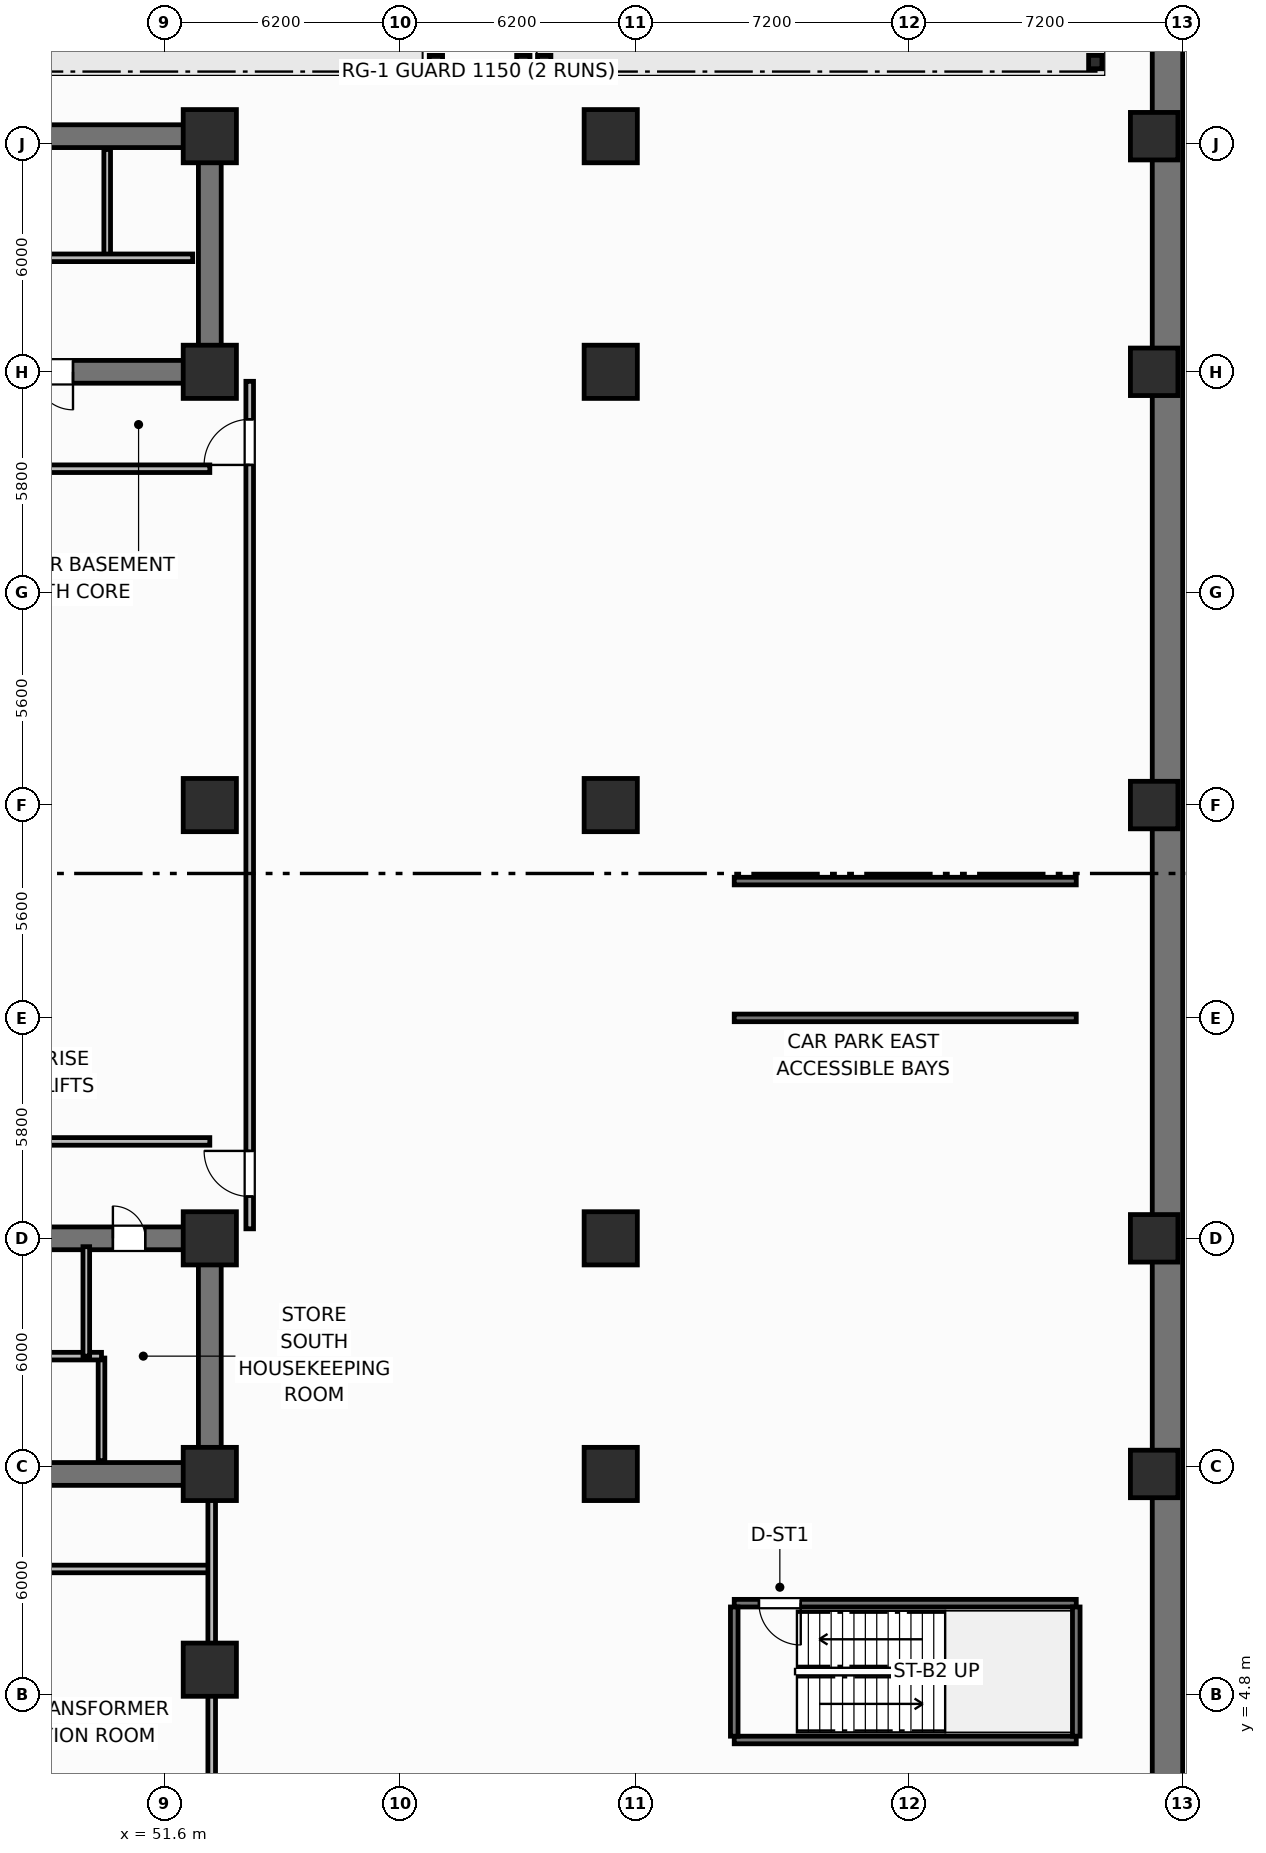
"""IFC4 building model, lengths in metres.
Left out: names, types, materials, properties, quantities, classifications, styles, units other than length and angle.
Written with IfcOpenShell. Run it as: python <this file> out.ifc"""

import sys

from ifc_helpers import new_model, si_unit, direction, frame, frame_2d, origin, origin_2d, place, context, subcontext, project, spatial, rectangle, i_section, extrude, element, fill, save


model = new_model("IFC4")
c1 = context("Model", 3, precision=1e-05, world=origin(), true_north=direction((0.0, 1.0)))
c2 = subcontext(c1, "Body", "Model", "MODEL_VIEW")
j1 = project(units=[si_unit("LENGTHUNIT", "METRE"), si_unit("PLANEANGLEUNIT", "RADIAN")], contexts=[c1])
p1 = place(None, origin())
s1 = spatial("IfcSite", under=j1, at=p1, CompositionType="ELEMENT")
p2 = place(p1, origin())
s2 = spatial("IfcBuilding", under=s1, at=p2, CompositionType="ELEMENT")
p3 = place(p2, frame((0.0, 0.0, -4.8)))
s3 = spatial("IfcBuildingStorey", under=s2, at=p3, CompositionType="ELEMENT", Elevation=-4.8)
p4 = place(p3, frame((78.0, 55.6, 0.0), z_axis=(0.0, 0.0, 1.0), x_axis=(0.0, -1.0, 0.0)))
e1 = element("IfcWall", 1, at=p4, inside=s3, PredefinedType="USERDEFINED", context=c2, shape_type="SweptSolid", body=[
    extrude(rectangle(XDim=54.8, YDim=0.8, at=frame_2d((27.4, 0.0))), origin(), (0.0, 0.0, 1.0), 4.8),
])
for number, where, z_axis, x_axis in (
    (2, (58.75, 47.75, 0.0), (0.0, 0.0, 1.0), (1.0, 0.0, 0.0)),
    (3, (61.05, 47.75, 0.0), (0.0, 0.0, 1.0), (1.0, 0.0, 0.0)),
):
    element("IfcColumn", number, at=place(p3, frame(where, z_axis=z_axis, x_axis=x_axis)), inside=s3, PredefinedType="COLUMN", context=c2, shape_type="SweptSolid", body=[
        extrude(i_section(OverallWidth=0.35, OverallDepth=0.352, WebThickness=0.013, FlangeThickness=0.021, at=origin_2d()), origin(), (0.0, 0.0, 1.0), 2.09),
    ])
p5 = place(p3, frame((61.6, 47.75, 0.0), z_axis=(0.0, 0.0, 1.0), x_axis=(1.0, 0.0, 0.0)))
e4 = element("IfcColumn", 4, at=p5, inside=s3, PredefinedType="COLUMN", context=c2, shape_type="SweptSolid", body=[
    extrude(i_section(OverallWidth=0.35, OverallDepth=0.352, WebThickness=0.013, FlangeThickness=0.021, at=origin_2d()), origin(), (0.0, 0.0, 1.0), 2.13),
])
p6 = place(p3, frame((76.1, 47.75, 0.0), z_axis=(0.0, 0.0, 1.0), x_axis=(1.0, 0.0, 0.0)))
e5 = element("IfcColumn", 5, at=p6, inside=s3, PredefinedType="COLUMN", context=c2, shape_type="SweptSolid", body=[
    extrude(i_section(OverallWidth=0.35, OverallDepth=0.352, WebThickness=0.013, FlangeThickness=0.021, at=origin_2d()), origin(), (0.0, 0.0, 1.0), 4.46),
])
p7 = place(p3, frame((52.8, 10.6, 0.0), z_axis=(0.0, 0.0, 1.0), x_axis=(-1.0, 0.0, 0.0)))
e6 = element("IfcWall", 6, at=p7, inside=s3, PredefinedType="SHEAR", context=c2, shape_type="SweptSolid", body=[
    extrude(rectangle(XDim=27.2, YDim=0.6, at=frame_2d((13.6, 0.0))), origin(), (0.0, 0.0, 1.0), 4.8),
])
p8 = place(p3, frame((52.8, 10.9, 0.0), z_axis=(0.0, 0.0, 1.0), x_axis=(0.0, 1.0, 0.0)))
e7 = element("IfcWall", 7, at=p8, inside=s3, PredefinedType="SHEAR", context=c2, shape_type="SweptSolid", body=[
    extrude(rectangle(XDim=5.6, YDim=0.6, at=frame_2d((2.8, 0.0))), origin(), (0.0, 0.0, 1.0), 4.8),
])
p9 = place(p3, frame((25.6, 16.8, 0.0), z_axis=(0.0, 0.0, 1.0), x_axis=(1.0, 0.0, 0.0)))
e8 = element("IfcWall", 8, at=p9, inside=s3, PredefinedType="SHEAR", context=c2, shape_type="SweptSolid", body=[
    extrude(rectangle(XDim=27.2, YDim=0.6, at=frame_2d((13.6, 0.0))), origin(), (0.0, 0.0, 1.0), 4.8),
])
p10 = place(p9, frame((1.9, 0.0, 0.0)))
e9 = element("IfcOpeningElement", 9, at=p10, cuts=e8, PredefinedType="OPENING", context=c2, shape_type="SweptSolid", body=[
    extrude(rectangle(XDim=1.1, YDim=2.15, at=frame_2d((0.55, 1.075))), frame((0.0, 0.31, 0.0), z_axis=(0.0, -1.0, 0.0), x_axis=(1.0, 0.0, 0.0)), (0.0, 0.0, 1.0), 0.62),
])
p11 = place(p9, frame((13.0, 0.0, 0.0)))
e10 = element("IfcOpeningElement", 10, at=p11, cuts=e8, PredefinedType="OPENING", context=c2, shape_type="SweptSolid", body=[
    extrude(rectangle(XDim=1.2, YDim=2.15, at=frame_2d((0.6, 1.075))), frame((0.0, 0.31, 0.0), z_axis=(0.0, -1.0, 0.0), x_axis=(1.0, 0.0, 0.0)), (0.0, 0.0, 1.0), 0.62),
])
p12 = place(p9, frame((20.4, 0.0, 0.0)))
e11 = element("IfcOpeningElement", 11, at=p12, cuts=e8, PredefinedType="OPENING", context=c2, shape_type="SweptSolid", body=[
    extrude(rectangle(XDim=1.3, YDim=2.2, at=frame_2d((0.65, 1.1))), frame((0.0, 0.31, 0.0), z_axis=(0.0, -1.0, 0.0), x_axis=(1.0, 0.0, 0.0)), (0.0, 0.0, 1.0), 0.62),
])
p13 = place(p9, frame((24.65, 0.0, 0.0)))
e12 = element("IfcOpeningElement", 12, at=p13, cuts=e8, PredefinedType="OPENING", context=c2, shape_type="SweptSolid", body=[
    extrude(rectangle(XDim=0.85, YDim=2.1, at=frame_2d((0.425, 1.05))), frame((0.0, 0.31, 0.0), z_axis=(0.0, -1.0, 0.0), x_axis=(1.0, 0.0, 0.0)), (0.0, 0.0, 1.0), 0.62),
])
p14 = place(p3, frame((25.6, 45.8, 0.0), z_axis=(0.0, 0.0, 1.0), x_axis=(1.0, 0.0, 0.0)))
e13 = element("IfcWall", 13, at=p14, inside=s3, PredefinedType="SHEAR", context=c2, shape_type="SweptSolid", body=[
    extrude(rectangle(XDim=27.2, YDim=0.6, at=frame_2d((13.6, 0.0))), origin(), (0.0, 0.0, 1.0), 4.8),
])
p15 = place(p3, frame((52.8, 39.9, 0.0), z_axis=(0.0, 0.0, 1.0), x_axis=(0.0, 1.0, 0.0)))
e14 = element("IfcWall", 14, at=p15, inside=s3, PredefinedType="SHEAR", context=c2, shape_type="SweptSolid", body=[
    extrude(rectangle(XDim=5.6, YDim=0.6, at=frame_2d((2.8, 0.0))), origin(), (0.0, 0.0, 1.0), 4.8),
])
p16 = place(p3, frame((52.8, 39.6, 0.0), z_axis=(0.0, 0.0, 1.0), x_axis=(-1.0, 0.0, 0.0)))
e15 = element("IfcWall", 15, at=p16, inside=s3, PredefinedType="SHEAR", context=c2, shape_type="SweptSolid", body=[
    extrude(rectangle(XDim=27.2, YDim=0.6, at=frame_2d((13.6, 0.0))), origin(), (0.0, 0.0, 1.0), 4.8),
])
p17 = place(p16, frame((24.2, 0.0, 0.0)))
e16 = element("IfcOpeningElement", 16, at=p17, cuts=e15, PredefinedType="OPENING", context=c2, shape_type="SweptSolid", body=[
    extrude(rectangle(XDim=1.1, YDim=2.15, at=frame_2d((0.55, 1.075))), frame((0.0, 0.31, 0.0), z_axis=(0.0, -1.0, 0.0), x_axis=(1.0, 0.0, 0.0)), (0.0, 0.0, 1.0), 0.62),
])
p18 = place(p16, frame((15.1, 0.0, 0.0)))
e17 = element("IfcOpeningElement", 17, at=p18, cuts=e15, PredefinedType="OPENING", context=c2, shape_type="SweptSolid", body=[
    extrude(rectangle(XDim=1.2, YDim=2.15, at=frame_2d((0.6, 1.075))), frame((0.0, 0.31, 0.0), z_axis=(0.0, -1.0, 0.0), x_axis=(1.0, 0.0, 0.0)), (0.0, 0.0, 1.0), 0.62),
])
p19 = place(p16, frame((11.6, 0.0, 0.0)))
e18 = element("IfcOpeningElement", 18, at=p19, cuts=e15, PredefinedType="OPENING", context=c2, shape_type="SweptSolid", body=[
    extrude(rectangle(XDim=0.9, YDim=2.1, at=frame_2d((0.45, 1.05))), frame((0.0, 0.31, 0.0), z_axis=(0.0, -1.0, 0.0), x_axis=(1.0, 0.0, 0.0)), (0.0, 0.0, 1.0), 0.62),
])
p20 = place(p16, frame((3.6, 0.0, 0.0)))
e19 = element("IfcOpeningElement", 19, at=p20, cuts=e15, PredefinedType="OPENING", context=c2, shape_type="SweptSolid", body=[
    extrude(rectangle(XDim=1.0, YDim=2.15, at=frame_2d((0.5, 1.075))), frame((0.0, 0.31, 0.0), z_axis=(0.0, -1.0, 0.0), x_axis=(1.0, 0.0, 0.0)), (0.0, 0.0, 1.0), 0.62),
])
for number, where, z_axis, x_axis in (
    (20, (52.8, 10.6, 0.0), (0.0, 0.0, 1.0), (1.0, 0.0, 0.0)),
    (21, (52.8, 16.8, 0.0), (0.0, 0.0, 1.0), (1.0, 0.0, 0.0)),
    (22, (52.8, 39.6, 0.0), (0.0, 0.0, 1.0), (1.0, 0.0, 0.0)),
    (23, (52.8, 45.8, 0.0), (0.0, 0.0, 1.0), (1.0, 0.0, 0.0)),
    (24, (52.8, 28.2, 0.0), (0.0, 0.0, 1.0), (1.0, 0.0, 0.0)),
):
    element("IfcColumn", number, at=place(p3, frame(where, z_axis=z_axis, x_axis=x_axis)), inside=s3, PredefinedType="COLUMN", context=c2, shape_type="SweptSolid", body=[
        extrude(rectangle(XDim=1.4, YDim=1.4, at=origin_2d()), origin(), (0.0, 0.0, 1.0), 4.8),
    ])
for number, where, z_axis, x_axis in (
    (25, (77.65, 10.6, 0.0), (0.0, 0.0, 1.0), (1.0, 0.0, 0.0)),
    (26, (77.65, 16.8, 0.0), (0.0, 0.0, 1.0), (1.0, 0.0, 0.0)),
    (27, (77.65, 28.2, 0.0), (0.0, 0.0, 1.0), (1.0, 0.0, 0.0)),
    (28, (77.65, 39.6, 0.0), (0.0, 0.0, 1.0), (1.0, 0.0, 0.0)),
    (29, (77.65, 45.8, 0.0), (0.0, 0.0, 1.0), (1.0, 0.0, 0.0)),
):
    element("IfcColumn", number, at=place(p3, frame(where, z_axis=z_axis, x_axis=x_axis)), inside=s3, PredefinedType="COLUMN", context=c2, shape_type="SweptSolid", body=[
        extrude(rectangle(XDim=1.25, YDim=1.25, at=origin_2d()), origin(), (0.0, 0.0, 1.0), 4.8),
    ])
for number, where, z_axis, x_axis in (
    (30, (52.8, 5.45, 0.0), (0.0, 0.0, 1.0), (1.0, 0.0, 0.0)),
    (31, (63.35, 10.6, 0.0), (0.0, 0.0, 1.0), (1.0, 0.0, 0.0)),
    (32, (63.35, 16.8, 0.0), (0.0, 0.0, 1.0), (1.0, 0.0, 0.0)),
    (33, (63.35, 28.2, 0.0), (0.0, 0.0, 1.0), (1.0, 0.0, 0.0)),
    (34, (63.35, 39.6, 0.0), (0.0, 0.0, 1.0), (1.0, 0.0, 0.0)),
    (35, (63.35, 45.8, 0.0), (0.0, 0.0, 1.0), (1.0, 0.0, 0.0)),
):
    element("IfcColumn", number, at=place(p3, frame(where, z_axis=z_axis, x_axis=x_axis)), inside=s3, PredefinedType="COLUMN", context=c2, shape_type="SweptSolid", body=[
        extrude(rectangle(XDim=1.4, YDim=1.4, at=origin_2d()), origin(), (0.0, 0.0, 1.0), 4.8),
    ])
for number, where, z_axis, x_axis in (
    (36, (66.6, 22.6, 0.0), (0.0, 0.0, 1.0), (1.0, 0.0, 0.0)),
    (37, (66.6, 26.2, 0.0), (0.0, 0.0, 1.0), (1.0, 0.0, 0.0)),
):
    element("IfcWall", number, at=place(p3, frame(where, z_axis=z_axis, x_axis=x_axis)), inside=s3, PredefinedType="SHEAR", context=c2, shape_type="SweptSolid", body=[
        extrude(rectangle(XDim=9.0, YDim=0.2, at=frame_2d((4.5, 0.0))), origin(), (0.0, 0.0, 1.0), 4.8),
    ])
p21 = place(p3, frame((49.95, 10.95, 0.0), z_axis=(0.0, 0.0, 1.0), x_axis=(0.0, 1.0, 0.0)))
e38 = element("IfcWall", 38, at=p21, inside=s3, PredefinedType="PARTITIONING", context=c2, shape_type="SweptSolid", body=[
    extrude(rectangle(XDim=2.7, YDim=0.175, at=frame_2d((1.35, 0.0))), origin(), (0.0, 0.0, 1.0), 3.67),
])
p22 = place(p3, frame((43.55, 13.7, 0.0), z_axis=(0.0, 0.0, 1.0), x_axis=(1.0, 0.0, 0.0)))
e39 = element("IfcWall", 39, at=p22, inside=s3, PredefinedType="PARTITIONING", context=c2, shape_type="SweptSolid", body=[
    extrude(rectangle(XDim=6.4, YDim=0.2, at=frame_2d((3.2, 0.0))), origin(), (0.0, 0.0, 1.0), 3.67),
])
p23 = place(p3, frame((49.55, 13.7, 0.0), z_axis=(0.0, 0.0, 1.0), x_axis=(0.0, 1.0, 0.0)))
e40 = element("IfcWall", 40, at=p23, inside=s3, PredefinedType="PARTITIONING", context=c2, shape_type="SweptSolid", body=[
    extrude(rectangle(XDim=2.88, YDim=0.175, at=frame_2d((1.44, 0.0))), origin(), (0.0, 0.0, 1.0), 3.67),
])
p24 = place(p3, frame((50.1, 42.65, 0.0), z_axis=(0.0, 0.0, 1.0), x_axis=(0.0, 1.0, 0.0)))
e41 = element("IfcWall", 41, at=p24, inside=s3, PredefinedType="PARTITIONING", context=c2, shape_type="SweptSolid", body=[
    extrude(rectangle(XDim=2.8, YDim=0.175, at=frame_2d((1.4, 0.0))), origin(), (0.0, 0.0, 1.0), 3.67),
])
p25 = place(p3, frame((52.35, 42.6, 0.0), z_axis=(0.0, 0.0, 1.0), x_axis=(-1.0, 0.0, 0.0)))
e42 = element("IfcWall", 42, at=p25, inside=s3, PredefinedType="PARTITIONING", context=c2, shape_type="SweptSolid", body=[
    extrude(rectangle(XDim=8.8, YDim=0.2, at=frame_2d((4.4, 0.0))), origin(), (0.0, 0.0, 1.0), 3.67),
])
p26 = place(p3, frame((66.6, 3.6, 0.0), z_axis=(0.0, 0.0, 1.0), x_axis=(1.0, 0.0, 0.0)))
e43 = element("IfcWall", 43, at=p26, inside=s3, PredefinedType="SHEAR", context=c2, shape_type="SweptSolid", body=[
    extrude(rectangle(XDim=9.0, YDim=0.2, at=frame_2d((4.5, 0.0))), origin(), (0.0, 0.0, 1.0), 4.8),
])
p27 = place(p3, frame((75.6, 7.2, 0.0), z_axis=(0.0, 0.0, 1.0), x_axis=(-1.0, 0.0, 0.0)))
e44 = element("IfcWall", 44, at=p27, inside=s3, PredefinedType="SHEAR", context=c2, shape_type="SweptSolid", body=[
    extrude(rectangle(XDim=9.0, YDim=0.2, at=frame_2d((4.5, 0.0))), origin(), (0.0, 0.0, 1.0), 4.8),
])
p28 = place(p27, frame((7.25, 0.0, 0.0)))
e45 = element("IfcOpeningElement", 45, at=p28, cuts=e44, PredefinedType="OPENING", context=c2, shape_type="SweptSolid", body=[
    extrude(rectangle(XDim=1.1, YDim=2.15, at=frame_2d((0.55, 1.075))), frame((0.0, 0.11, 0.0), z_axis=(0.0, -1.0, 0.0), x_axis=(1.0, 0.0, 0.0)), (0.0, 0.0, 1.0), 0.22),
])
for number, where, z_axis, x_axis in (
    (46, (66.6, 3.7, 0.0), (0.0, 0.0, 1.0), (0.0, 1.0, 0.0)),
    (47, (75.6, 3.7, 0.0), (0.0, 0.0, 1.0), (0.0, 1.0, 0.0)),
):
    element("IfcWall", number, at=place(p3, frame(where, z_axis=z_axis, x_axis=x_axis)), inside=s3, PredefinedType="SHEAR", context=c2, shape_type="SweptSolid", body=[
        extrude(rectangle(XDim=3.4, YDim=0.2, at=frame_2d((1.7, 0.0))), origin(), (0.0, 0.0, 1.0), 4.8),
    ])
p29 = place(p3, frame((25.6, 19.35, 0.0), z_axis=(0.0, 0.0, 1.0), x_axis=(1.0, 0.0, 0.0)))
e48 = element("IfcWall", 48, at=p29, inside=s3, PredefinedType="PARTITIONING", context=c2, shape_type="SweptSolid", body=[
    extrude(rectangle(XDim=27.2, YDim=0.2, at=frame_2d((13.6, 0.0))), origin(), (0.0, 0.0, 1.0), 3.67),
])
p30 = place(p29, frame((6.0, 0.0, 0.0)))
e49 = element("IfcOpeningElement", 49, at=p30, cuts=e48, PredefinedType="OPENING", context=c2, shape_type="SweptSolid", body=[
    extrude(rectangle(XDim=1.2, YDim=2.15, at=frame_2d((0.6, 1.075))), frame((0.0, 0.11, 0.0), z_axis=(0.0, -1.0, 0.0), x_axis=(1.0, 0.0, 0.0)), (0.0, 0.0, 1.0), 0.22),
])
p31 = place(p3, frame((52.8, 37.05, 0.0), z_axis=(0.0, 0.0, 1.0), x_axis=(-1.0, 0.0, 0.0)))
e50 = element("IfcWall", 50, at=p31, inside=s3, PredefinedType="PARTITIONING", context=c2, shape_type="SweptSolid", body=[
    extrude(rectangle(XDim=27.2, YDim=0.2, at=frame_2d((13.6, 0.0))), origin(), (0.0, 0.0, 1.0), 3.67),
])
p32 = place(p31, frame((6.0, 0.0, 0.0)))
e51 = element("IfcOpeningElement", 51, at=p32, cuts=e50, PredefinedType="OPENING", context=c2, shape_type="SweptSolid", body=[
    extrude(rectangle(XDim=1.2, YDim=2.15, at=frame_2d((0.6, 1.075))), frame((0.0, 0.11, 0.0), z_axis=(0.0, -1.0, 0.0), x_axis=(1.0, 0.0, 0.0)), (0.0, 0.0, 1.0), 0.22),
])
p33 = place(p3, frame((53.85, 17.05, 0.0), z_axis=(0.0, 0.0, 1.0), x_axis=(0.0, 1.0, 0.0)))
e52 = element("IfcWall", 52, at=p33, inside=s3, PredefinedType="PARTITIONING", context=c2, shape_type="SweptSolid", body=[
    extrude(rectangle(XDim=22.3, YDim=0.2, at=frame_2d((11.15, 0.0))), origin(), (0.0, 0.0, 1.0), 3.67),
])
p34 = place(p33, frame((0.85, 0.0, 0.0)))
e53 = element("IfcOpeningElement", 53, at=p34, cuts=e52, PredefinedType="OPENING", context=c2, shape_type="SweptSolid", body=[
    extrude(rectangle(XDim=1.2, YDim=2.15, at=frame_2d((0.6, 1.075))), frame((0.0, 0.11, 0.0), z_axis=(0.0, -1.0, 0.0), x_axis=(1.0, 0.0, 0.0)), (0.0, 0.0, 1.0), 0.22),
])
p35 = place(p33, frame((20.1, 0.0, 0.0)))
e54 = element("IfcOpeningElement", 54, at=p35, cuts=e52, PredefinedType="OPENING", context=c2, shape_type="SweptSolid", body=[
    extrude(rectangle(XDim=1.2, YDim=2.15, at=frame_2d((0.6, 1.075))), frame((0.0, 0.11, 0.0), z_axis=(0.0, -1.0, 0.0), x_axis=(1.0, 0.0, 0.0)), (0.0, 0.0, 1.0), 0.22),
])
p36 = place(p3, frame((23.2, 8.1, 0.0), z_axis=(0.0, 0.0, 1.0), x_axis=(1.0, 0.0, 0.0)))
e55 = element("IfcWall", 55, at=p36, inside=s3, PredefinedType="PARTITIONING", context=c2, shape_type="SweptSolid", body=[
    extrude(rectangle(XDim=29.65, YDim=0.2, at=frame_2d((14.825, 0.0))), origin(), (0.0, 0.0, 1.0), 3.67),
])
p37 = place(p36, frame((5.2, 0.0, 0.0)))
e56 = element("IfcOpeningElement", 56, at=p37, cuts=e55, PredefinedType="OPENING", context=c2, shape_type="SweptSolid", body=[
    extrude(rectangle(XDim=1.2, YDim=2.15, at=frame_2d((0.6, 1.075))), frame((0.0, 0.11, 0.0), z_axis=(0.0, -1.0, 0.0), x_axis=(1.0, 0.0, 0.0)), (0.0, 0.0, 1.0), 0.22),
])
p38 = place(p36, frame((14.2, 0.0, 0.0)))
e57 = element("IfcOpeningElement", 57, at=p38, cuts=e55, PredefinedType="OPENING", context=c2, shape_type="SweptSolid", body=[
    extrude(rectangle(XDim=1.2, YDim=2.15, at=frame_2d((0.6, 1.075))), frame((0.0, 0.11, 0.0), z_axis=(0.0, -1.0, 0.0), x_axis=(1.0, 0.0, 0.0)), (0.0, 0.0, 1.0), 0.22),
])
p39 = place(p36, frame((23.2, 0.0, 0.0)))
e58 = element("IfcOpeningElement", 58, at=p39, cuts=e55, PredefinedType="OPENING", context=c2, shape_type="SweptSolid", body=[
    extrude(rectangle(XDim=1.2, YDim=2.15, at=frame_2d((0.6, 1.075))), frame((0.0, 0.11, 0.0), z_axis=(0.0, -1.0, 0.0), x_axis=(1.0, 0.0, 0.0)), (0.0, 0.0, 1.0), 0.22),
])
p40 = place(p3, frame((52.85, 0.85, 0.0), z_axis=(0.0, 0.0, 1.0), x_axis=(0.0, 1.0, 0.0)))
e59 = element("IfcWall", 59, at=p40, inside=s3, PredefinedType="PARTITIONING", context=c2, shape_type="SweptSolid", body=[
    extrude(rectangle(XDim=9.4, YDim=0.2, at=frame_2d((4.7, 0.0))), origin(), (0.0, 0.0, 1.0), 3.67),
])
p41 = place(p28, origin())
e60 = element("IfcDoor", 60, at=p41, inside=s3, OperationType="SINGLE_SWING_LEFT", PredefinedType="DOOR", context=c2, shape_type="SweptSolid", body=[
    extrude(rectangle(XDim=1.1, YDim=2.15, at=frame_2d((0.55, 1.075))), frame((0.0, 0.025, 0.0), z_axis=(0.0, -1.0, 0.0), x_axis=(1.0, 0.0, 0.0)), (0.0, 0.0, 1.0), 0.05),
])
fill(e45, e60)
p42 = place(p34, origin())
e61 = element("IfcDoor", 61, at=p42, inside=s3, OperationType="SINGLE_SWING_RIGHT", PredefinedType="DOOR", context=c2, shape_type="SweptSolid", body=[
    extrude(rectangle(XDim=1.2, YDim=2.15, at=frame_2d((0.6, 1.075))), frame((0.0, 0.025, 0.0), z_axis=(0.0, -1.0, 0.0), x_axis=(1.0, 0.0, 0.0)), (0.0, 0.0, 1.0), 0.05),
])
fill(e53, e61)
p43 = place(p35, origin())
e62 = element("IfcDoor", 62, at=p43, inside=s3, OperationType="SINGLE_SWING_LEFT", PredefinedType="DOOR", context=c2, shape_type="SweptSolid", body=[
    extrude(rectangle(XDim=1.2, YDim=2.15, at=frame_2d((0.6, 1.075))), frame((0.0, 0.025, 0.0), z_axis=(0.0, -1.0, 0.0), x_axis=(1.0, 0.0, 0.0)), (0.0, 0.0, 1.0), 0.05),
])
fill(e54, e62)
p44 = place(p13, origin())
e63 = element("IfcDoor", 63, at=p44, inside=s3, OperationType="SINGLE_SWING_LEFT", PredefinedType="DOOR", context=c2, shape_type="SweptSolid", body=[
    extrude(rectangle(XDim=0.85, YDim=2.1, at=frame_2d((0.425, 1.05))), frame((0.0, 0.025, 0.0), z_axis=(0.0, -1.0, 0.0), x_axis=(1.0, 0.0, 0.0)), (0.0, 0.0, 1.0), 0.05),
])
fill(e12, e63)
p45 = place(p20, origin())
e64 = element("IfcDoor", 64, at=p45, inside=s3, OperationType="SINGLE_SWING_LEFT", PredefinedType="DOOR", context=c2, shape_type="SweptSolid", body=[
    extrude(rectangle(XDim=1.0, YDim=2.15, at=frame_2d((0.5, 1.075))), frame((0.0, 0.025, 0.0), z_axis=(0.0, -1.0, 0.0), x_axis=(1.0, 0.0, 0.0)), (0.0, 0.0, 1.0), 0.05),
])
fill(e19, e64)
save(model, sys.argv[1])
